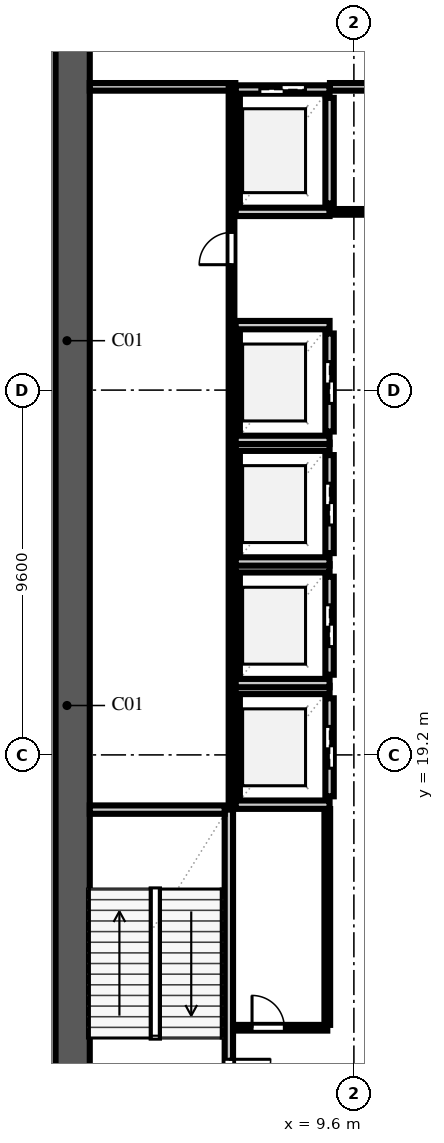
"""IFC4 building model, lengths in metres.
Left out: names, types, materials, properties, quantities, classifications, styles, units other than length and angle.
Written with IfcOpenShell. Run it as: python <this file> out.ifc"""

import sys

from ifc_helpers import new_model, si_unit, direction, frame, frame_2d, origin, place, context, subcontext, project, spatial, rectangle, extrude, element, fill, save


model = new_model("IFC4")
c1 = context("Model", 3, precision=1e-05, world=origin(), true_north=direction((0.0, 1.0)))
c2 = subcontext(c1, "Body", "Model", "MODEL_VIEW")
j1 = project(units=[si_unit("LENGTHUNIT", "METRE"), si_unit("PLANEANGLEUNIT", "RADIAN")], contexts=[c1])
p1 = place(None, origin())
s1 = spatial("IfcSite", under=j1, at=p1, CompositionType="ELEMENT")
p2 = place(p1, origin())
s2 = spatial("IfcBuilding", under=s1, at=p2, CompositionType="ELEMENT")
p3 = place(p2, origin())
s3 = spatial("IfcBuildingStorey", under=s2, at=p3, CompositionType="ELEMENT", Elevation=0.0)
p4 = place(p3, frame((2.2, 9.15, 0.0), z_axis=(0.0, 0.0, 1.0), x_axis=(0.0, 1.0, 0.0)))
e1 = element("IfcWall", 1, at=p4, inside=s3, PredefinedType="SHEAR", context=c2, shape_type="SweptSolid", body=[
    extrude(rectangle(XDim=39.3, YDim=0.9, at=frame_2d((19.65, 0.0))), origin(), (0.0, 0.0, 1.0), 4.86),
])
p5 = place(p3, frame((6.31, 9.95, 0.0), z_axis=(0.0, 0.0, 1.0), x_axis=(0.0, 1.0, 0.0)))
e2 = element("IfcWall", 2, at=p5, inside=s3, PredefinedType="SOLIDWALL", context=c2, shape_type="SweptSolid", body=[
    extrude(rectangle(XDim=7.81, YDim=0.22, at=frame_2d((3.905, 0.0))), origin(), (0.0, 0.0, 1.0), 4.86),
])
p6 = place(p5, frame((0.14, 0.0, 0.0)))
e3 = element("IfcOpeningElement", 3, at=p6, cuts=e2, PredefinedType="OPENING", context=c2, shape_type="SweptSolid", body=[
    extrude(rectangle(XDim=1.1, YDim=2.2, at=frame_2d((0.55, 1.1))), frame((0.0, 0.122, 0.0), z_axis=(0.0, -1.0, 0.0), x_axis=(1.0, 0.0, 0.0)), (0.0, 0.0, 1.0), 0.244),
])
p7 = place(p3, frame((2.65, 17.76, 0.0), z_axis=(0.0, 0.0, 1.0), x_axis=(1.0, 0.0, 0.0)))
e4 = element("IfcWall", 4, at=p7, inside=s3, PredefinedType="SOLIDWALL", context=c2, shape_type="SweptSolid", body=[
    extrude(rectangle(XDim=3.55, YDim=0.22, at=frame_2d((1.775, 0.0))), origin(), (0.0, 0.0, 1.0), 4.86),
])
p8 = place(p3, frame((6.49, 18.11, 0.0), z_axis=(0.0, 0.0, 1.0), x_axis=(0.0, 1.0, 0.0)))
e5 = element("IfcWall", 5, at=p8, inside=s3, PredefinedType="SOLIDWALL", context=c2, shape_type="SweptSolid", body=[
    extrude(rectangle(XDim=2.58, YDim=0.22, at=frame_2d((1.29, 0.0))), origin(), (0.0, 0.0, 1.0), 4.86),
])
p9 = place(p3, frame((8.96, 18.11, 0.0), z_axis=(0.0, 0.0, 1.0), x_axis=(0.0, 1.0, 0.0)))
e6 = element("IfcWall", 6, at=p9, inside=s3, PredefinedType="SOLIDWALL", context=c2, shape_type="SweptSolid", body=[
    extrude(rectangle(XDim=2.58, YDim=0.22, at=frame_2d((1.29, 0.0))), origin(), (0.0, 0.0, 1.0), 4.86),
])
p10 = place(p9, frame((0.74, 0.0, 0.0)))
e7 = element("IfcOpeningElement", 7, at=p10, cuts=e6, PredefinedType="OPENING", context=c2, shape_type="SweptSolid", body=[
    extrude(rectangle(XDim=1.1, YDim=2.2, at=frame_2d((0.55, 1.1))), frame((0.0, 0.122, 0.0), z_axis=(0.0, -1.0, 0.0), x_axis=(1.0, 0.0, 0.0)), (0.0, 0.0, 1.0), 0.244),
])
for number, where, z_axis, x_axis in (
    (8, (6.49, 17.89, 0.0), (0.0, 0.0, 1.0), (1.0, 0.0, 0.0)),
    (9, (6.49, 20.91, 0.0), (0.0, 0.0, 1.0), (1.0, 0.0, 0.0)),
):
    element("IfcWall", number, at=place(p3, frame(where, z_axis=z_axis, x_axis=x_axis)), inside=s3, PredefinedType="SOLIDWALL", context=c2, shape_type="SweptSolid", body=[
        extrude(rectangle(XDim=2.47, YDim=0.22, at=frame_2d((1.235, 0.0))), origin(), (0.0, 0.0, 1.0), 4.86),
    ])
p11 = place(p3, frame((6.49, 21.31, 0.0), z_axis=(0.0, 0.0, 1.0), x_axis=(0.0, 1.0, 0.0)))
e10 = element("IfcWall", 10, at=p11, inside=s3, PredefinedType="SOLIDWALL", context=c2, shape_type="SweptSolid", body=[
    extrude(rectangle(XDim=2.58, YDim=0.22, at=frame_2d((1.29, 0.0))), origin(), (0.0, 0.0, 1.0), 4.86),
])
p12 = place(p3, frame((8.96, 21.31, 0.0), z_axis=(0.0, 0.0, 1.0), x_axis=(0.0, 1.0, 0.0)))
e11 = element("IfcWall", 11, at=p12, inside=s3, PredefinedType="SOLIDWALL", context=c2, shape_type="SweptSolid", body=[
    extrude(rectangle(XDim=2.58, YDim=0.22, at=frame_2d((1.29, 0.0))), origin(), (0.0, 0.0, 1.0), 4.86),
])
p13 = place(p12, frame((0.74, 0.0, 0.0)))
e12 = element("IfcOpeningElement", 12, at=p13, cuts=e11, PredefinedType="OPENING", context=c2, shape_type="SweptSolid", body=[
    extrude(rectangle(XDim=1.1, YDim=2.2, at=frame_2d((0.55, 1.1))), frame((0.0, 0.122, 0.0), z_axis=(0.0, -1.0, 0.0), x_axis=(1.0, 0.0, 0.0)), (0.0, 0.0, 1.0), 0.244),
])
for number, where, z_axis, x_axis in (
    (13, (6.49, 21.09, 0.0), (0.0, 0.0, 1.0), (1.0, 0.0, 0.0)),
    (14, (6.49, 24.11, 0.0), (0.0, 0.0, 1.0), (1.0, 0.0, 0.0)),
):
    element("IfcWall", number, at=place(p3, frame(where, z_axis=z_axis, x_axis=x_axis)), inside=s3, PredefinedType="SOLIDWALL", context=c2, shape_type="SweptSolid", body=[
        extrude(rectangle(XDim=2.47, YDim=0.22, at=frame_2d((1.235, 0.0))), origin(), (0.0, 0.0, 1.0), 4.86),
    ])
p14 = place(p3, frame((6.49, 24.51, 0.0), z_axis=(0.0, 0.0, 1.0), x_axis=(0.0, 1.0, 0.0)))
e15 = element("IfcWall", 15, at=p14, inside=s3, PredefinedType="SOLIDWALL", context=c2, shape_type="SweptSolid", body=[
    extrude(rectangle(XDim=2.58, YDim=0.22, at=frame_2d((1.29, 0.0))), origin(), (0.0, 0.0, 1.0), 4.86),
])
p15 = place(p3, frame((8.96, 24.51, 0.0), z_axis=(0.0, 0.0, 1.0), x_axis=(0.0, 1.0, 0.0)))
e16 = element("IfcWall", 16, at=p15, inside=s3, PredefinedType="SOLIDWALL", context=c2, shape_type="SweptSolid", body=[
    extrude(rectangle(XDim=2.58, YDim=0.22, at=frame_2d((1.29, 0.0))), origin(), (0.0, 0.0, 1.0), 4.86),
])
p16 = place(p15, frame((0.74, 0.0, 0.0)))
e17 = element("IfcOpeningElement", 17, at=p16, cuts=e16, PredefinedType="OPENING", context=c2, shape_type="SweptSolid", body=[
    extrude(rectangle(XDim=1.1, YDim=2.2, at=frame_2d((0.55, 1.1))), frame((0.0, 0.122, 0.0), z_axis=(0.0, -1.0, 0.0), x_axis=(1.0, 0.0, 0.0)), (0.0, 0.0, 1.0), 0.244),
])
for number, where, z_axis, x_axis in (
    (18, (6.49, 24.29, 0.0), (0.0, 0.0, 1.0), (1.0, 0.0, 0.0)),
    (19, (6.49, 27.31, 0.0), (0.0, 0.0, 1.0), (1.0, 0.0, 0.0)),
):
    element("IfcWall", number, at=place(p3, frame(where, z_axis=z_axis, x_axis=x_axis)), inside=s3, PredefinedType="SOLIDWALL", context=c2, shape_type="SweptSolid", body=[
        extrude(rectangle(XDim=2.47, YDim=0.22, at=frame_2d((1.235, 0.0))), origin(), (0.0, 0.0, 1.0), 4.86),
    ])
p17 = place(p3, frame((6.49, 27.71, 0.0), z_axis=(0.0, 0.0, 1.0), x_axis=(0.0, 1.0, 0.0)))
e20 = element("IfcWall", 20, at=p17, inside=s3, PredefinedType="SOLIDWALL", context=c2, shape_type="SweptSolid", body=[
    extrude(rectangle(XDim=2.58, YDim=0.22, at=frame_2d((1.29, 0.0))), origin(), (0.0, 0.0, 1.0), 4.86),
])
p18 = place(p3, frame((8.96, 27.71, 0.0), z_axis=(0.0, 0.0, 1.0), x_axis=(0.0, 1.0, 0.0)))
e21 = element("IfcWall", 21, at=p18, inside=s3, PredefinedType="SOLIDWALL", context=c2, shape_type="SweptSolid", body=[
    extrude(rectangle(XDim=2.58, YDim=0.22, at=frame_2d((1.29, 0.0))), origin(), (0.0, 0.0, 1.0), 4.86),
])
p19 = place(p18, frame((0.74, 0.0, 0.0)))
e22 = element("IfcOpeningElement", 22, at=p19, cuts=e21, PredefinedType="OPENING", context=c2, shape_type="SweptSolid", body=[
    extrude(rectangle(XDim=1.1, YDim=2.2, at=frame_2d((0.55, 1.1))), frame((0.0, 0.122, 0.0), z_axis=(0.0, -1.0, 0.0), x_axis=(1.0, 0.0, 0.0)), (0.0, 0.0, 1.0), 0.244),
])
for number, where, z_axis, x_axis in (
    (23, (6.49, 27.49, 0.0), (0.0, 0.0, 1.0), (1.0, 0.0, 0.0)),
    (24, (6.49, 30.51, 0.0), (0.0, 0.0, 1.0), (1.0, 0.0, 0.0)),
):
    element("IfcWall", number, at=place(p3, frame(where, z_axis=z_axis, x_axis=x_axis)), inside=s3, PredefinedType="SOLIDWALL", context=c2, shape_type="SweptSolid", body=[
        extrude(rectangle(XDim=2.47, YDim=0.22, at=frame_2d((1.235, 0.0))), origin(), (0.0, 0.0, 1.0), 4.86),
    ])
for number, where, z_axis, x_axis in (
    (25, (6.49, 33.71, 0.0), (0.0, 0.0, 1.0), (0.0, 1.0, 0.0)),
    (26, (8.96, 33.71, 0.0), (0.0, 0.0, 1.0), (0.0, 1.0, 0.0)),
):
    element("IfcWall", number, at=place(p3, frame(where, z_axis=z_axis, x_axis=x_axis)), inside=s3, PredefinedType="SOLIDWALL", context=c2, shape_type="SweptSolid", body=[
        extrude(rectangle(XDim=2.78, YDim=0.22, at=frame_2d((1.39, 0.0))), origin(), (0.0, 0.0, 1.0), 4.86),
    ])
p20 = place(p3, frame((6.49, 33.49, 0.0), z_axis=(0.0, 0.0, 1.0), x_axis=(1.0, 0.0, 0.0)))
e27 = element("IfcWall", 27, at=p20, inside=s3, PredefinedType="SOLIDWALL", context=c2, shape_type="SweptSolid", body=[
    extrude(rectangle(XDim=2.47, YDim=0.22, at=frame_2d((1.235, 0.0))), origin(), (0.0, 0.0, 1.0), 4.86),
])
p21 = place(p3, frame((6.49, 36.71, 0.0), z_axis=(0.0, 0.0, 1.0), x_axis=(1.0, 0.0, 0.0)))
e28 = element("IfcWall", 28, at=p21, inside=s3, PredefinedType="SOLIDWALL", context=c2, shape_type="SweptSolid", body=[
    extrude(rectangle(XDim=2.47, YDim=0.22, at=frame_2d((1.235, 0.0))), origin(), (0.0, 0.0, 1.0), 4.86),
])
p22 = place(p21, frame((0.635, 0.0, 0.0)))
e29 = element("IfcOpeningElement", 29, at=p22, cuts=e28, PredefinedType="OPENING", context=c2, shape_type="SweptSolid", body=[
    extrude(rectangle(XDim=1.2, YDim=2.2, at=frame_2d((0.6, 1.1))), frame((0.0, 0.122, 0.0), z_axis=(0.0, -1.0, 0.0), x_axis=(1.0, 0.0, 0.0)), (0.0, 0.0, 1.0), 0.244),
])
p23 = place(p3, frame((2.65, 36.78, 0.0), z_axis=(0.0, 0.0, 1.0), x_axis=(1.0, 0.0, 0.0)))
e30 = element("IfcWall", 30, at=p23, inside=s3, PredefinedType="SOLIDWALL", context=c2, shape_type="SweptSolid", body=[
    extrude(rectangle(XDim=3.83, YDim=0.2, at=frame_2d((1.915, 0.0))), origin(), (0.0, 0.0, 1.0), 4.86),
])
p24 = place(p3, frame((8.97, 36.78, 0.0), z_axis=(0.0, 0.0, 1.0), x_axis=(1.0, 0.0, 0.0)))
e31 = element("IfcWall", 31, at=p24, inside=s3, PredefinedType="SOLIDWALL", context=c2, shape_type="SweptSolid", body=[
    extrude(rectangle(XDim=1.51, YDim=0.2, at=frame_2d((0.755, 0.0))), origin(), (0.0, 0.0, 1.0), 4.86),
])
p25 = place(p3, frame((8.965, 33.49, 0.0), z_axis=(0.0, 0.0, 1.0), x_axis=(1.0, 0.0, 0.0)))
e32 = element("IfcWall", 32, at=p25, inside=s3, PredefinedType="PARTITIONING", context=c2, shape_type="SweptSolid", body=[
    extrude(rectangle(XDim=1.52, YDim=0.15, at=frame_2d((0.76, 0.0))), origin(), (0.0, 0.0, 1.0), 4.86),
])
p26 = place(p3, frame((6.42, 12.02, 0.0), z_axis=(0.0, 0.0, 1.0), x_axis=(1.0, 0.0, 0.0)))
e33 = element("IfcWall", 33, at=p26, inside=s3, PredefinedType="PARTITIONING", context=c2, shape_type="SweptSolid", body=[
    extrude(rectangle(XDim=2.48, YDim=0.15, at=frame_2d((1.24, 0.0))), origin(), (0.0, 0.0, 1.0), 4.86),
])
p27 = place(p26, frame((0.5, 0.0, 0.0)))
e34 = element("IfcOpeningElement", 34, at=p27, cuts=e33, PredefinedType="OPENING", context=c2, shape_type="SweptSolid", body=[
    extrude(rectangle(XDim=0.85, YDim=2.1, at=frame_2d((0.425, 1.05))), frame((0.0, 0.087, 0.0), z_axis=(0.0, -1.0, 0.0), x_axis=(1.0, 0.0, 0.0)), (0.0, 0.0, 1.0), 0.174),
])
p28 = place(p3, frame((8.9, 12.095, 0.0), z_axis=(0.0, 0.0, 1.0), x_axis=(0.0, 1.0, 0.0)))
e35 = element("IfcWall", 35, at=p28, inside=s3, PredefinedType="PARTITIONING", context=c2, shape_type="SweptSolid", body=[
    extrude(rectangle(XDim=5.68, YDim=0.15, at=frame_2d((2.84, 0.0))), origin(), (0.0, 0.0, 1.0), 4.86),
])
p29 = place(p3, frame((6.38, 17.8, 0.0), z_axis=(0.0, 0.0, 1.0), x_axis=(0.0, 1.0, 0.0)))
e36 = element("IfcWall", 36, at=p29, inside=s3, PredefinedType="PARTITIONING", context=c2, shape_type="SweptSolid", body=[
    extrude(rectangle(XDim=18.98, YDim=0.15, at=frame_2d((9.49, 0.0))), origin(), (0.0, 0.0, 1.0), 4.86),
])
p30 = place(p29, frame((14.3, 0.0, 0.0)))
e37 = element("IfcOpeningElement", 37, at=p30, cuts=e36, PredefinedType="OPENING", context=c2, shape_type="SweptSolid", body=[
    extrude(rectangle(XDim=0.85, YDim=2.1, at=frame_2d((0.425, 1.05))), frame((0.0, 0.087, 0.0), z_axis=(0.0, -1.0, 0.0), x_axis=(1.0, 0.0, 0.0)), (0.0, 0.0, 1.0), 0.174),
])
p31 = place(p6, frame((1.1, 0.0, 0.0), z_axis=(0.0, 0.0, 1.0), x_axis=(-1.0, 0.0, 0.0)))
e38 = element("IfcDoor", 38, at=p31, inside=s3, OperationType="SINGLE_SWING_LEFT", PredefinedType="DOOR", context=c2, shape_type="SweptSolid", body=[
    extrude(rectangle(XDim=1.1, YDim=2.2, at=frame_2d((0.55, 1.1))), frame((0.0, 0.025, 0.0), z_axis=(0.0, -1.0, 0.0), x_axis=(1.0, 0.0, 0.0)), (0.0, 0.0, 1.0), 0.05),
])
fill(e3, e38)
p32 = place(p10, origin())
e39 = element("IfcDoor", 39, at=p32, inside=s3, OperationType="DOUBLE_DOOR_SLIDING", PredefinedType="DOOR", context=c2, shape_type="SweptSolid", body=[
    extrude(rectangle(XDim=1.1, YDim=2.2, at=frame_2d((0.55, 1.1))), frame((0.0, 0.025, 0.0), z_axis=(0.0, -1.0, 0.0), x_axis=(1.0, 0.0, 0.0)), (0.0, 0.0, 1.0), 0.05),
])
fill(e7, e39)
p33 = place(p13, origin())
e40 = element("IfcDoor", 40, at=p33, inside=s3, OperationType="DOUBLE_DOOR_SLIDING", PredefinedType="DOOR", context=c2, shape_type="SweptSolid", body=[
    extrude(rectangle(XDim=1.1, YDim=2.2, at=frame_2d((0.55, 1.1))), frame((0.0, 0.025, 0.0), z_axis=(0.0, -1.0, 0.0), x_axis=(1.0, 0.0, 0.0)), (0.0, 0.0, 1.0), 0.05),
])
fill(e12, e40)
p34 = place(p16, origin())
e41 = element("IfcDoor", 41, at=p34, inside=s3, OperationType="DOUBLE_DOOR_SLIDING", PredefinedType="DOOR", context=c2, shape_type="SweptSolid", body=[
    extrude(rectangle(XDim=1.1, YDim=2.2, at=frame_2d((0.55, 1.1))), frame((0.0, 0.025, 0.0), z_axis=(0.0, -1.0, 0.0), x_axis=(1.0, 0.0, 0.0)), (0.0, 0.0, 1.0), 0.05),
])
fill(e17, e41)
p35 = place(p19, origin())
e42 = element("IfcDoor", 42, at=p35, inside=s3, OperationType="DOUBLE_DOOR_SLIDING", PredefinedType="DOOR", context=c2, shape_type="SweptSolid", body=[
    extrude(rectangle(XDim=1.1, YDim=2.2, at=frame_2d((0.55, 1.1))), frame((0.0, 0.025, 0.0), z_axis=(0.0, -1.0, 0.0), x_axis=(1.0, 0.0, 0.0)), (0.0, 0.0, 1.0), 0.05),
])
fill(e22, e42)
p36 = place(p22, origin())
e43 = element("IfcDoor", 43, at=p36, inside=s3, OperationType="DOUBLE_DOOR_SLIDING", PredefinedType="DOOR", context=c2, shape_type="SweptSolid", body=[
    extrude(rectangle(XDim=1.2, YDim=2.2, at=frame_2d((0.6, 1.1))), frame((0.0, 0.025, 0.0), z_axis=(0.0, -1.0, 0.0), x_axis=(1.0, 0.0, 0.0)), (0.0, 0.0, 1.0), 0.05),
])
fill(e29, e43)
p37 = place(p27, origin())
e44 = element("IfcDoor", 44, at=p37, inside=s3, OperationType="SINGLE_SWING_LEFT", PredefinedType="DOOR", context=c2, shape_type="SweptSolid", body=[
    extrude(rectangle(XDim=0.85, YDim=2.1, at=frame_2d((0.425, 1.05))), frame((0.0, 0.025, 0.0), z_axis=(0.0, -1.0, 0.0), x_axis=(1.0, 0.0, 0.0)), (0.0, 0.0, 1.0), 0.05),
])
fill(e34, e44)
p38 = place(p30, origin())
e45 = element("IfcDoor", 45, at=p38, inside=s3, OperationType="SINGLE_SWING_LEFT", PredefinedType="DOOR", context=c2, shape_type="SweptSolid", body=[
    extrude(rectangle(XDim=0.85, YDim=2.1, at=frame_2d((0.425, 1.05))), frame((0.0, 0.025, 0.0), z_axis=(0.0, -1.0, 0.0), x_axis=(1.0, 0.0, 0.0)), (0.0, 0.0, 1.0), 0.05),
])
fill(e37, e45)
save(model, sys.argv[1])
